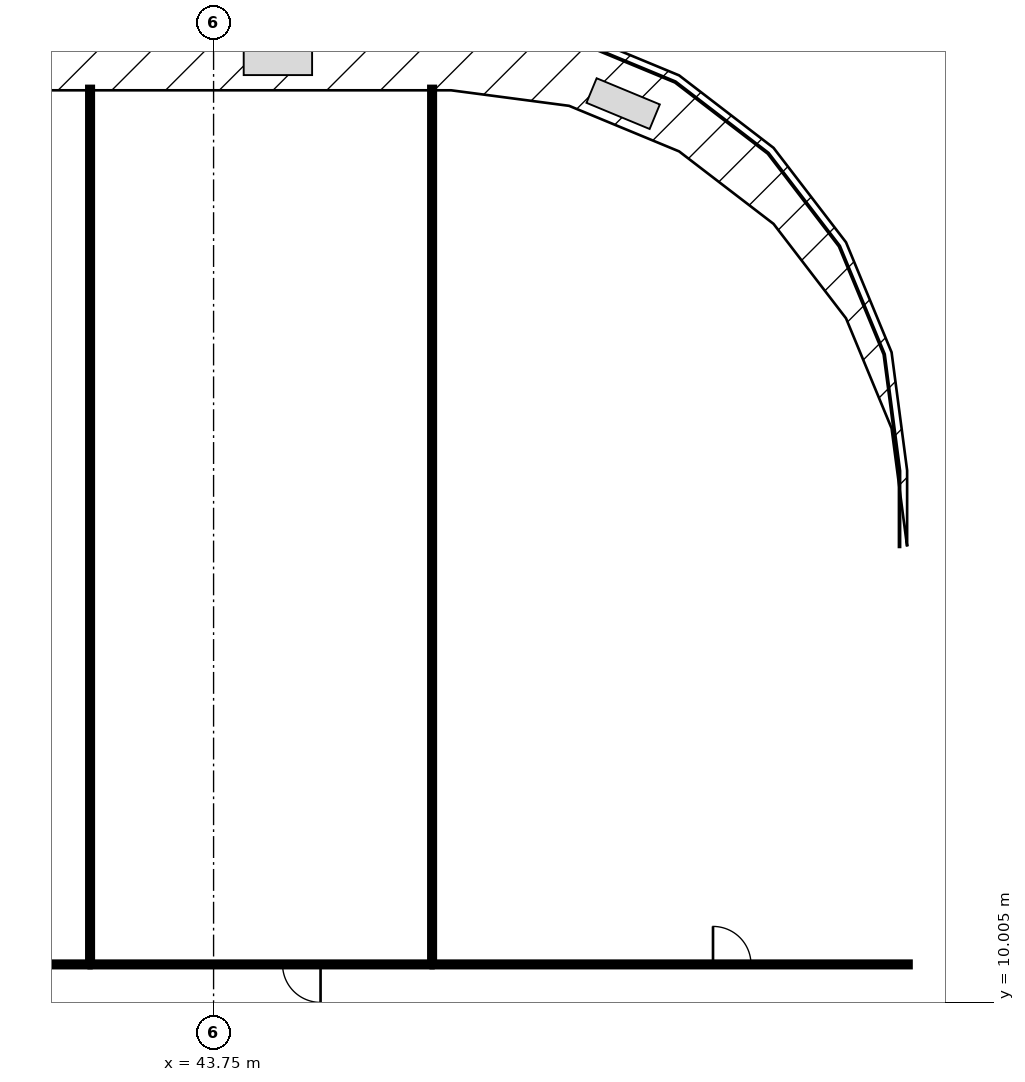
"""IFC4 building model, lengths in metres.
Left out: names, types, materials, properties, quantities, classifications, styles, units other than length and angle.
Written with IfcOpenShell. Run it as: python <this file> out.ifc"""

import sys

from ifc_helpers import new_model, si_unit, direction, frame, frame_2d, origin, origin_2d, place, context, subcontext, project, spatial, rectangle, circle, extrude, element, fill, save


model = new_model("IFC4")
c1 = context("Model", 3, precision=1e-05, world=origin(), true_north=direction((0.0, 1.0)))
c2 = subcontext(c1, "Body", "Model", "MODEL_VIEW")
j1 = project(units=[si_unit("LENGTHUNIT", "METRE"), si_unit("PLANEANGLEUNIT", "RADIAN")], contexts=[c1])
p1 = place(None, origin())
s1 = spatial("IfcSite", under=j1, at=p1, CompositionType="ELEMENT")
p2 = place(p1, origin())
s2 = spatial("IfcBuilding", under=s1, at=p2, CompositionType="ELEMENT")
p3 = place(p2, frame((0.0, 0.0, 7.0)))
s3 = spatial("IfcBuildingStorey", under=s2, at=p3, CompositionType="ELEMENT", Elevation=7.0)
for number, where, z_axis, x_axis in (
    (1, (54.6, 12.6, 0.0), (0.0, 0.0, 1.0), (1.0, 0.0, 0.0)),
    (2, (54.6, 21.0, 0.0), (0.0, 0.0, 1.0), (1.0, 0.0, 0.0)),
    (3, (54.6, 27.4, 0.0), (0.0, 0.0, 1.0), (1.0, 0.0, 0.0)),
    (4, (59.4, 21.0, 0.0), (0.0, 0.0, 1.0), (1.0, 0.0, 0.0)),
):
    element("IfcColumn", number, at=place(p3, frame(where, z_axis=z_axis, x_axis=x_axis)), inside=s3, PredefinedType="COLUMN", context=c2, shape_type="SweptSolid", body=[
        extrude(circle(Radius=0.6, at=origin_2d()), origin(), (0.0, 0.0, 1.0), 5.0),
    ])
p4 = place(p3, frame((40.5, 11.0, 0.0), z_axis=(0.0, 0.0, 1.0), x_axis=(-1.0, 0.0, 0.0)))
e5 = element("IfcWall", 5, at=p4, inside=s3, PredefinedType="PARTITIONING", context=c2, shape_type="SweptSolid", body=[
    extrude(rectangle(XDim=15.0, YDim=0.125, at=frame_2d((7.5, 0.0))), origin(), (0.0, 0.0, 1.0), 3.918),
])
p5 = place(p3, frame((49.5, 11.0, 0.0), z_axis=(0.0, 0.0, 1.0), x_axis=(-1.0, 0.0, 0.0)))
e6 = element("IfcWall", 6, at=p5, inside=s3, PredefinedType="PARTITIONING", context=c2, shape_type="SweptSolid", body=[
    extrude(rectangle(XDim=9.0, YDim=0.125, at=frame_2d((4.5, 0.0))), origin(), (0.0, 0.0, 1.0), 4.077),
])
p6 = place(p5, frame((2.935, 0.0, 0.0)))
e7 = element("IfcOpeningElement", 7, at=p6, cuts=e6, PredefinedType="OPENING", context=c2, shape_type="SweptSolid", body=[
    extrude(rectangle(XDim=1.0, YDim=2.1, at=frame_2d((0.5, 1.05))), frame((0.0, 0.073, 0.0), z_axis=(0.0, -1.0, 0.0), x_axis=(1.0, 0.0, 0.0)), (0.0, 0.0, 1.0), 0.145),
])
p7 = place(p3, frame((62.08, 11.0, 0.0), z_axis=(0.0, 0.0, 1.0), x_axis=(-1.0, 0.0, 0.0)))
e8 = element("IfcWall", 8, at=p7, inside=s3, PredefinedType="PARTITIONING", context=c2, shape_type="SweptSolid", body=[
    extrude(rectangle(XDim=12.58, YDim=0.125, at=frame_2d((6.29, 0.0))), origin(), (0.0, 0.0, 1.0), 3.762),
])
p8 = place(p7, frame((4.188, 0.0, 0.0)))
e9 = element("IfcOpeningElement", 9, at=p8, cuts=e8, PredefinedType="OPENING", context=c2, shape_type="SweptSolid", body=[
    extrude(rectangle(XDim=1.0, YDim=2.1, at=frame_2d((0.5, 1.05))), frame((0.0, 0.073, 0.0), z_axis=(0.0, -1.0, 0.0), x_axis=(1.0, 0.0, 0.0)), (0.0, 0.0, 1.0), 0.145),
])
for number, where, z_axis, x_axis in (
    (10, (40.5, 11.062, 0.0), (0.0, 0.0, 1.0), (0.0, 1.0, 0.0)),
    (11, (49.5, 11.062, 0.0), (0.0, 0.0, 1.0), (0.0, 1.0, 0.0)),
):
    element("IfcWall", number, at=place(p3, frame(where, z_axis=z_axis, x_axis=x_axis)), inside=s3, PredefinedType="PARTITIONING", context=c2, shape_type="SweptSolid", body=[
        extrude(rectangle(XDim=23.018, YDim=0.125, at=frame_2d((11.509, 0.0))), origin(), (0.0, 0.0, 1.0), 3.996),
    ])
p9 = place(p6, origin())
e12 = element("IfcDoor", 12, at=p9, inside=s3, OperationType="SINGLE_SWING_LEFT", PredefinedType="DOOR", context=c2, shape_type="SweptSolid", body=[
    extrude(rectangle(XDim=1.0, YDim=2.1, at=frame_2d((0.5, 1.05))), frame((0.0, 0.025, 0.0), z_axis=(0.0, -1.0, 0.0), x_axis=(1.0, 0.0, 0.0)), (0.0, 0.0, 1.0), 0.05),
])
fill(e7, e12)
p10 = place(p8, origin())
e13 = element("IfcDoor", 13, at=p10, inside=s3, OperationType="SINGLE_SWING_RIGHT", PredefinedType="DOOR", context=c2, shape_type="SweptSolid", body=[
    extrude(rectangle(XDim=1.0, YDim=2.1, at=frame_2d((0.5, 1.05))), frame((0.0, 0.025, 0.0), z_axis=(0.0, -1.0, 0.0), x_axis=(1.0, 0.0, 0.0)), (0.0, 0.0, 1.0), 0.05),
])
fill(e9, e13)
save(model, sys.argv[1])
